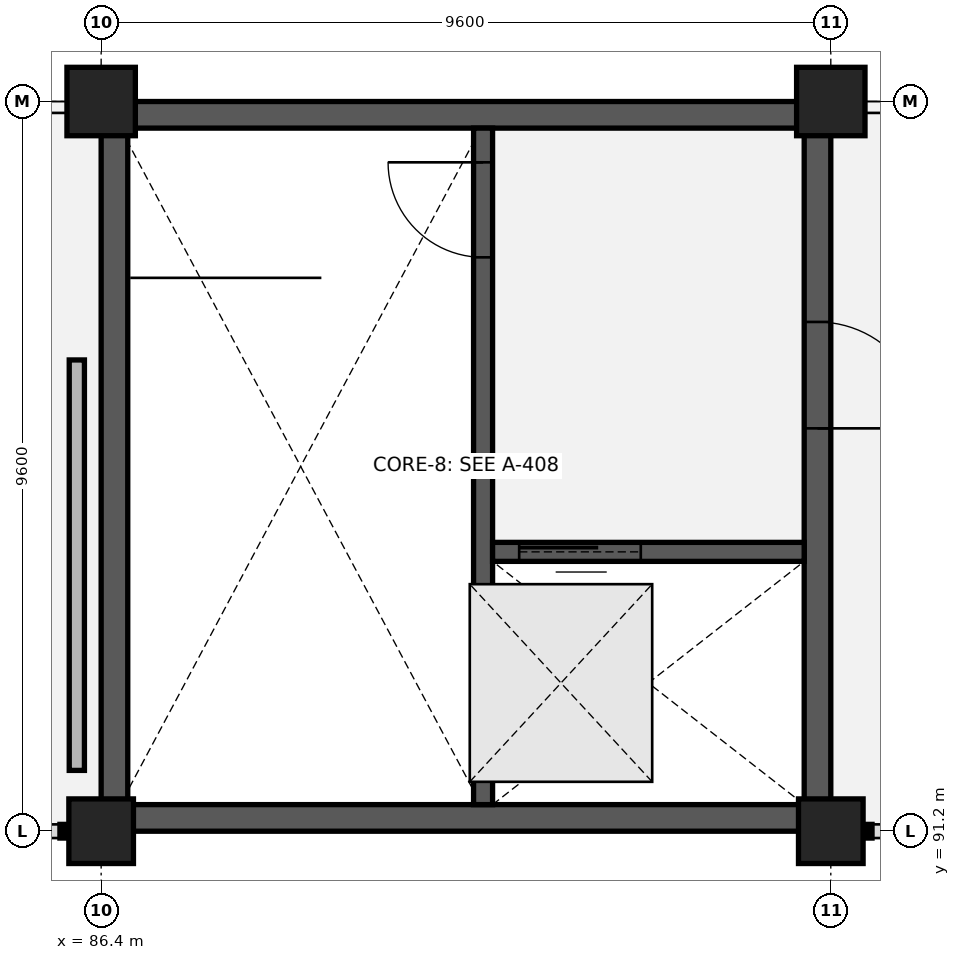
"""IFC4 building model, lengths in metres.
Left out: names, types, materials, properties, quantities, classifications, styles, units other than length and angle.
Written with IfcOpenShell. Run it as: python <this file> out.ifc"""

import sys

from ifc_helpers import new_model, si_unit, direction, frame, frame_2d, origin, origin_2d, place, context, subcontext, project, spatial, rectangle, extrude, element, fill, save


model = new_model("IFC4")
c1 = context("Model", 3, precision=1e-05, world=origin(), true_north=direction((0.0, 1.0)))
c2 = subcontext(c1, "Body", "Model", "MODEL_VIEW")
j1 = project(units=[si_unit("LENGTHUNIT", "METRE"), si_unit("PLANEANGLEUNIT", "RADIAN")], contexts=[c1])
p1 = place(None, origin())
s1 = spatial("IfcSite", under=j1, at=p1, CompositionType="ELEMENT")
p2 = place(p1, origin())
s2 = spatial("IfcBuilding", under=s1, at=p2, CompositionType="ELEMENT")
p3 = place(p2, frame((0.0, 0.0, 5.4)))
s3 = spatial("IfcBuildingStorey", under=s2, at=p3, CompositionType="ELEMENT", Elevation=5.4)
p4 = place(p3, frame((86.4, 91.2, 0.0), z_axis=(0.0, 0.0, 1.0), x_axis=(1.0, 0.0, 0.0)))
e1 = element("IfcColumn", 1, at=p4, inside=s3, PredefinedType="COLUMN", context=c2, shape_type="SweptSolid", body=[
    extrude(rectangle(XDim=0.85, YDim=0.85, at=origin_2d()), origin(), (0.0, 0.0, 1.0), 4.8),
])
p5 = place(p3, frame((86.4, 100.8, 0.0), z_axis=(0.0, 0.0, 1.0), x_axis=(1.0, 0.0, 0.0)))
e2 = element("IfcColumn", 2, at=p5, inside=s3, PredefinedType="COLUMN", context=c2, shape_type="SweptSolid", body=[
    extrude(rectangle(XDim=0.9, YDim=0.9, at=origin_2d()), origin(), (0.0, 0.0, 1.0), 4.8),
])
p6 = place(p3, frame((96.0, 91.2, 0.0), z_axis=(0.0, 0.0, 1.0), x_axis=(1.0, 0.0, 0.0)))
e3 = element("IfcColumn", 3, at=p6, inside=s3, PredefinedType="COLUMN", context=c2, shape_type="SweptSolid", body=[
    extrude(rectangle(XDim=0.85, YDim=0.85, at=origin_2d()), origin(), (0.0, 0.0, 1.0), 4.8),
])
p7 = place(p3, frame((96.0, 100.8, 0.0), z_axis=(0.0, 0.0, 1.0), x_axis=(1.0, 0.0, 0.0)))
e4 = element("IfcColumn", 4, at=p7, inside=s3, PredefinedType="COLUMN", context=c2, shape_type="SweptSolid", body=[
    extrude(rectangle(XDim=0.9, YDim=0.9, at=origin_2d()), origin(), (0.0, 0.0, 1.0), 4.8),
])
for number, where, z_axis, x_axis in (
    (5, (86.4, 100.625, 0.0), (0.0, 0.0, 1.0), (1.0, 0.0, 0.0)),
    (6, (86.4, 91.375, 0.0), (0.0, 0.0, 1.0), (1.0, 0.0, 0.0)),
    (7, (86.575, 91.2, 0.0), (0.0, 0.0, 1.0), (0.0, 1.0, 0.0)),
):
    element("IfcWall", number, at=place(p3, frame(where, z_axis=z_axis, x_axis=x_axis)), inside=s3, PredefinedType="SHEAR", context=c2, shape_type="SweptSolid", body=[
        extrude(rectangle(XDim=9.6, YDim=0.35, at=frame_2d((4.8, 0.0))), origin(), (0.0, 0.0, 1.0), 4.48),
    ])
p8 = place(p3, frame((95.825, 91.2, 0.0), z_axis=(0.0, 0.0, 1.0), x_axis=(0.0, 1.0, 0.0)))
e8 = element("IfcWall", 8, at=p8, inside=s3, PredefinedType="SHEAR", context=c2, shape_type="SweptSolid", body=[
    extrude(rectangle(XDim=9.6, YDim=0.35, at=frame_2d((4.8, 0.0))), origin(), (0.0, 0.0, 1.0), 4.48),
])
p9 = place(p8, frame((5.3, 0.0, 0.0)))
e9 = element("IfcOpeningElement", 9, at=p9, cuts=e8, PredefinedType="OPENING", context=c2, shape_type="SweptSolid", body=[
    extrude(rectangle(XDim=1.4, YDim=2.15, at=frame_2d((0.7, 1.075))), frame((0.0, 0.185, 0.0), z_axis=(0.0, -1.0, 0.0), x_axis=(1.0, 0.0, 0.0)), (0.0, 0.0, 1.0), 0.37),
])
p10 = place(p3, frame((91.425, 100.45, 0.0), z_axis=(0.0, 0.0, 1.0), x_axis=(0.0, -1.0, 0.0)))
e10 = element("IfcWall", 10, at=p10, inside=s3, PredefinedType="SHEAR", context=c2, shape_type="SweptSolid", body=[
    extrude(rectangle(XDim=8.9, YDim=0.25, at=frame_2d((4.45, 0.0))), origin(), (0.0, 0.0, 1.0), 4.48),
])
p11 = place(p10, frame((0.45, 0.0, 0.0)))
e11 = element("IfcOpeningElement", 11, at=p11, cuts=e10, PredefinedType="OPENING", context=c2, shape_type="SweptSolid", body=[
    extrude(rectangle(XDim=1.25, YDim=2.15, at=frame_2d((0.625, 1.075))), frame((0.0, 0.135, 0.0), z_axis=(0.0, -1.0, 0.0), x_axis=(1.0, 0.0, 0.0)), (0.0, 0.0, 1.0), 0.27),
])
p12 = place(p3, frame((91.55, 94.875, 0.0), z_axis=(0.0, 0.0, 1.0), x_axis=(1.0, 0.0, 0.0)))
e12 = element("IfcWall", 12, at=p12, inside=s3, PredefinedType="SHEAR", context=c2, shape_type="SweptSolid", body=[
    extrude(rectangle(XDim=4.1, YDim=0.25, at=frame_2d((2.05, 0.0))), origin(), (0.0, 0.0, 1.0), 4.48),
])
p13 = place(p12, frame((0.35, 0.0, 0.0)))
e13 = element("IfcOpeningElement", 13, at=p13, cuts=e12, PredefinedType="OPENING", context=c2, shape_type="SweptSolid", body=[
    extrude(rectangle(XDim=1.6, YDim=2.2, at=frame_2d((0.8, 1.1))), frame((0.0, 0.135, 0.0), z_axis=(0.0, -1.0, 0.0), x_axis=(1.0, 0.0, 0.0)), (0.0, 0.0, 1.0), 0.27),
])
p14 = place(p3, frame((86.08, 92.0, 0.0), z_axis=(0.0, 0.0, 1.0), x_axis=(0.0, 1.0, 0.0)))
e14 = element("IfcWall", 14, at=p14, inside=s3, PredefinedType="PARTITIONING", context=c2, shape_type="SweptSolid", body=[
    extrude(rectangle(XDim=5.4, YDim=0.2, at=frame_2d((2.7, 0.0))), origin(), (0.0, 0.0, 1.0), 3.26),
])
p15 = place(p11, origin())
e15 = element("IfcDoor", 15, at=p15, inside=s3, OperationType="SINGLE_SWING_RIGHT", PredefinedType="DOOR", context=c2, shape_type="SweptSolid", body=[
    extrude(rectangle(XDim=1.25, YDim=2.15, at=frame_2d((0.625, 1.075))), frame((0.0, 0.025, 0.0), z_axis=(0.0, -1.0, 0.0), x_axis=(1.0, 0.0, 0.0)), (0.0, 0.0, 1.0), 0.05),
])
fill(e11, e15)
p16 = place(p13, origin())
e16 = element("IfcDoor", 16, at=p16, inside=s3, OperationType="SLIDING_TO_LEFT", PredefinedType="DOOR", context=c2, shape_type="SweptSolid", body=[
    extrude(rectangle(XDim=1.6, YDim=2.2, at=frame_2d((0.8, 1.1))), frame((0.0, 0.025, 0.0), z_axis=(0.0, -1.0, 0.0), x_axis=(1.0, 0.0, 0.0)), (0.0, 0.0, 1.0), 0.05),
])
fill(e13, e16)
p17 = place(p9, origin())
e17 = element("IfcDoor", 17, at=p17, inside=s3, OperationType="SINGLE_SWING_RIGHT", PredefinedType="DOOR", context=c2, shape_type="SweptSolid", body=[
    extrude(rectangle(XDim=1.4, YDim=2.15, at=frame_2d((0.7, 1.075))), frame((0.0, 0.025, 0.0), z_axis=(0.0, -1.0, 0.0), x_axis=(1.0, 0.0, 0.0)), (0.0, 0.0, 1.0), 0.05),
])
fill(e9, e17)
save(model, sys.argv[1])
